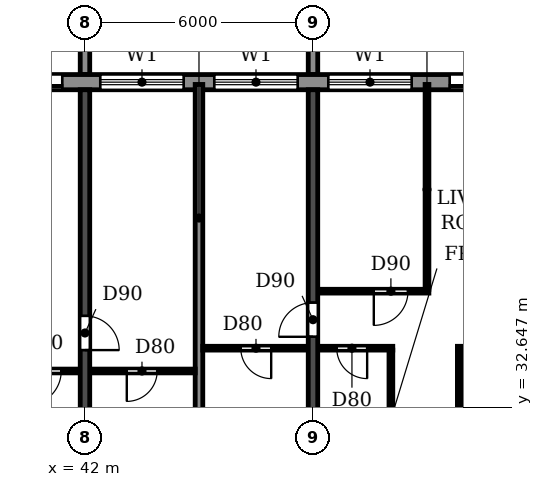
"""IFC4 building model, lengths in metres.
Left out: names, types, materials, properties, quantities, classifications, styles, units other than length and angle.
Written with IfcOpenShell. Run it as: python <this file> out.ifc"""

import sys

from ifc_helpers import new_model, si_unit, direction, frame, frame_2d, origin, place, context, subcontext, project, spatial, polyline, rectangle, outline, extrude, source, transform, mapped, element, fill, save


model = new_model("IFC4")
c1 = context("Model", 3, precision=1e-05, world=origin(), true_north=direction((0.0, 1.0)))
c2 = subcontext(c1, "Body", "Model", "MODEL_VIEW")
j1 = project(units=[si_unit("LENGTHUNIT", "METRE"), si_unit("PLANEANGLEUNIT", "RADIAN")], contexts=[c1])
p1 = place(None, origin())
s1 = spatial("IfcSite", under=j1, at=p1, CompositionType="ELEMENT")
p2 = place(p1, origin())
s2 = spatial("IfcBuilding", under=s1, at=p2, CompositionType="ELEMENT")
p3 = place(p2, frame((0.0, 0.0, 221.4)))
s3 = spatial("IfcBuildingStorey", under=s2, at=p3, CompositionType="ELEMENT", Elevation=221.4)
p4 = place(p3, frame((42.0, 30.5, 0.0), z_axis=(0.0, 0.0, 1.0), x_axis=(0.0, 1.0, 0.0)))
e1 = element("IfcWall", 1, at=p4, inside=s3, PredefinedType="SHEAR", context=c2, shape_type="SweptSolid", body=[
    extrude(rectangle(XDim=10.5, YDim=0.25, at=frame_2d((5.25, 0.0))), origin(), (0.0, 0.0, 1.0), 3.08),
])
p5 = place(p4, frame((3.65, 0.0, 0.0)))
e2 = element("IfcOpeningElement", 2, at=p5, cuts=e1, PredefinedType="OPENING", context=c2, shape_type="SweptSolid", body=[
    extrude(rectangle(XDim=0.9, YDim=2.1, at=frame_2d((0.45, 1.05))), frame((0.0, 0.135, 0.0), z_axis=(0.0, -1.0, 0.0), x_axis=(1.0, 0.0, 0.0)), (0.0, 0.0, 1.0), 0.27),
])
p6 = place(p3, frame((48.0, 30.5, 0.0), z_axis=(0.0, 0.0, 1.0), x_axis=(0.0, 1.0, 0.0)))
e3 = element("IfcWall", 3, at=p6, inside=s3, PredefinedType="SHEAR", context=c2, shape_type="SweptSolid", body=[
    extrude(rectangle(XDim=10.5, YDim=0.25, at=frame_2d((5.25, 0.0))), origin(), (0.0, 0.0, 1.0), 3.08),
])
p7 = place(p6, frame((4.0, 0.0, 0.0)))
e4 = element("IfcOpeningElement", 4, at=p7, cuts=e3, PredefinedType="OPENING", context=c2, shape_type="SweptSolid", body=[
    extrude(rectangle(XDim=0.9, YDim=2.1, at=frame_2d((0.45, 1.05))), frame((0.0, 0.135, 0.0), z_axis=(0.0, -1.0, 0.0), x_axis=(1.0, 0.0, 0.0)), (0.0, 0.0, 1.0), 0.27),
])
p8 = place(p3, frame((79.317, 41.2, 0.0), z_axis=(0.0, 0.0, 1.0), x_axis=(-1.0, 0.0, 0.0)))
e5 = element("IfcWall", 5, at=p8, inside=s3, PredefinedType="STANDARD", context=c2, shape_type="SweptSolid", body=[
    extrude(rectangle(XDim=56.634, YDim=0.4, at=frame_2d((28.317, 0.0))), origin(), (0.0, 0.0, 1.0), 3.08),
])
p9 = place(p8, frame((52.717, 0.0, 0.9)))
e6 = element("IfcOpeningElement", 6, at=p9, cuts=e5, PredefinedType="OPENING", context=c2, shape_type="SweptSolid", body=[
    extrude(rectangle(XDim=2.2, YDim=1.5, at=frame_2d((1.1, 0.75))), frame((0.0, 0.21, 0.0), z_axis=(0.0, -1.0, 0.0), x_axis=(1.0, 0.0, 0.0)), (0.0, 0.0, 1.0), 0.42),
])
p10 = place(p8, frame((49.717, 0.0, 0.9)))
e7 = element("IfcOpeningElement", 7, at=p10, cuts=e5, PredefinedType="OPENING", context=c2, shape_type="SweptSolid", body=[
    extrude(rectangle(XDim=2.2, YDim=1.5, at=frame_2d((1.1, 0.75))), frame((0.0, 0.21, 0.0), z_axis=(0.0, -1.0, 0.0), x_axis=(1.0, 0.0, 0.0)), (0.0, 0.0, 1.0), 0.42),
])
p11 = place(p8, frame((46.917, 0.0, 0.0)))
e8 = element("IfcOpeningElement", 8, at=p11, cuts=e5, PredefinedType="OPENING", context=c2, shape_type="SweptSolid", body=[
    extrude(rectangle(XDim=1.8, YDim=2.4, at=frame_2d((0.9, 1.2))), frame((0.0, 0.21, 0.0), z_axis=(0.0, -1.0, 0.0), x_axis=(1.0, 0.0, 0.0)), (0.0, 0.0, 1.0), 0.42),
])
p12 = place(p8, frame((43.717, 0.0, 0.9)))
e9 = element("IfcOpeningElement", 9, at=p12, cuts=e5, PredefinedType="OPENING", context=c2, shape_type="SweptSolid", body=[
    extrude(rectangle(XDim=2.2, YDim=1.5, at=frame_2d((1.1, 0.75))), frame((0.0, 0.21, 0.0), z_axis=(0.0, -1.0, 0.0), x_axis=(1.0, 0.0, 0.0)), (0.0, 0.0, 1.0), 0.42),
])
p13 = place(p8, frame((40.717, 0.0, 0.9)))
e10 = element("IfcOpeningElement", 10, at=p13, cuts=e5, PredefinedType="OPENING", context=c2, shape_type="SweptSolid", body=[
    extrude(rectangle(XDim=2.2, YDim=1.5, at=frame_2d((1.1, 0.75))), frame((0.0, 0.21, 0.0), z_axis=(0.0, -1.0, 0.0), x_axis=(1.0, 0.0, 0.0)), (0.0, 0.0, 1.0), 0.42),
])
p14 = place(p8, frame((37.917, 0.0, 0.0)))
e11 = element("IfcOpeningElement", 11, at=p14, cuts=e5, PredefinedType="OPENING", context=c2, shape_type="SweptSolid", body=[
    extrude(rectangle(XDim=1.8, YDim=2.4, at=frame_2d((0.9, 1.2))), frame((0.0, 0.21, 0.0), z_axis=(0.0, -1.0, 0.0), x_axis=(1.0, 0.0, 0.0)), (0.0, 0.0, 1.0), 0.42),
])
p15 = place(p8, frame((34.717, 0.0, 0.9)))
e12 = element("IfcOpeningElement", 12, at=p15, cuts=e5, PredefinedType="OPENING", context=c2, shape_type="SweptSolid", body=[
    extrude(rectangle(XDim=2.2, YDim=1.5, at=frame_2d((1.1, 0.75))), frame((0.0, 0.21, 0.0), z_axis=(0.0, -1.0, 0.0), x_axis=(1.0, 0.0, 0.0)), (0.0, 0.0, 1.0), 0.42),
])
p16 = place(p8, frame((31.717, 0.0, 0.9)))
e13 = element("IfcOpeningElement", 13, at=p16, cuts=e5, PredefinedType="OPENING", context=c2, shape_type="SweptSolid", body=[
    extrude(rectangle(XDim=2.2, YDim=1.5, at=frame_2d((1.1, 0.75))), frame((0.0, 0.21, 0.0), z_axis=(0.0, -1.0, 0.0), x_axis=(1.0, 0.0, 0.0)), (0.0, 0.0, 1.0), 0.42),
])
p17 = place(p8, frame((28.717, 0.0, 0.9)))
e14 = element("IfcOpeningElement", 14, at=p17, cuts=e5, PredefinedType="OPENING", context=c2, shape_type="SweptSolid", body=[
    extrude(rectangle(XDim=2.2, YDim=1.5, at=frame_2d((1.1, 0.75))), frame((0.0, 0.21, 0.0), z_axis=(0.0, -1.0, 0.0), x_axis=(1.0, 0.0, 0.0)), (0.0, 0.0, 1.0), 0.42),
])
p18 = place(p8, frame((25.917, 0.0, 0.0)))
e15 = element("IfcOpeningElement", 15, at=p18, cuts=e5, PredefinedType="OPENING", context=c2, shape_type="SweptSolid", body=[
    extrude(rectangle(XDim=1.8, YDim=2.4, at=frame_2d((0.9, 1.2))), frame((0.0, 0.21, 0.0), z_axis=(0.0, -1.0, 0.0), x_axis=(1.0, 0.0, 0.0)), (0.0, 0.0, 1.0), 0.42),
])
p19 = place(p8, frame((22.717, 0.0, 0.9)))
e16 = element("IfcOpeningElement", 16, at=p19, cuts=e5, PredefinedType="OPENING", context=c2, shape_type="SweptSolid", body=[
    extrude(rectangle(XDim=2.2, YDim=1.5, at=frame_2d((1.1, 0.75))), frame((0.0, 0.21, 0.0), z_axis=(0.0, -1.0, 0.0), x_axis=(1.0, 0.0, 0.0)), (0.0, 0.0, 1.0), 0.42),
])
p20 = place(p8, frame((19.717, 0.0, 0.9)))
e17 = element("IfcOpeningElement", 17, at=p20, cuts=e5, PredefinedType="OPENING", context=c2, shape_type="SweptSolid", body=[
    extrude(rectangle(XDim=2.2, YDim=1.5, at=frame_2d((1.1, 0.75))), frame((0.0, 0.21, 0.0), z_axis=(0.0, -1.0, 0.0), x_axis=(1.0, 0.0, 0.0)), (0.0, 0.0, 1.0), 0.42),
])
p21 = place(p8, frame((16.717, 0.0, 0.9)))
e18 = element("IfcOpeningElement", 18, at=p21, cuts=e5, PredefinedType="OPENING", context=c2, shape_type="SweptSolid", body=[
    extrude(rectangle(XDim=2.2, YDim=1.5, at=frame_2d((1.1, 0.75))), frame((0.0, 0.21, 0.0), z_axis=(0.0, -1.0, 0.0), x_axis=(1.0, 0.0, 0.0)), (0.0, 0.0, 1.0), 0.42),
])
p22 = place(p8, frame((13.917, 0.0, 0.0)))
e19 = element("IfcOpeningElement", 19, at=p22, cuts=e5, PredefinedType="OPENING", context=c2, shape_type="SweptSolid", body=[
    extrude(rectangle(XDim=1.8, YDim=2.4, at=frame_2d((0.9, 1.2))), frame((0.0, 0.21, 0.0), z_axis=(0.0, -1.0, 0.0), x_axis=(1.0, 0.0, 0.0)), (0.0, 0.0, 1.0), 0.42),
])
p23 = place(p8, frame((10.717, 0.0, 0.9)))
e20 = element("IfcOpeningElement", 20, at=p23, cuts=e5, PredefinedType="OPENING", context=c2, shape_type="SweptSolid", body=[
    extrude(rectangle(XDim=2.2, YDim=1.5, at=frame_2d((1.1, 0.75))), frame((0.0, 0.21, 0.0), z_axis=(0.0, -1.0, 0.0), x_axis=(1.0, 0.0, 0.0)), (0.0, 0.0, 1.0), 0.42),
])
p24 = place(p8, frame((7.917, 0.0, 0.0)))
e21 = element("IfcOpeningElement", 21, at=p24, cuts=e5, PredefinedType="OPENING", context=c2, shape_type="SweptSolid", body=[
    extrude(rectangle(XDim=1.8, YDim=2.4, at=frame_2d((0.9, 1.2))), frame((0.0, 0.21, 0.0), z_axis=(0.0, -1.0, 0.0), x_axis=(1.0, 0.0, 0.0)), (0.0, 0.0, 1.0), 0.42),
])
p25 = place(p8, frame((4.717, 0.0, 0.9)))
e22 = element("IfcOpeningElement", 22, at=p25, cuts=e5, PredefinedType="OPENING", context=c2, shape_type="SweptSolid", body=[
    extrude(rectangle(XDim=2.2, YDim=1.5, at=frame_2d((1.1, 0.75))), frame((0.0, 0.21, 0.0), z_axis=(0.0, -1.0, 0.0), x_axis=(1.0, 0.0, 0.0)), (0.0, 0.0, 1.0), 0.42),
])
p26 = place(p8, frame((1.917, 0.0, 0.0)))
e23 = element("IfcOpeningElement", 23, at=p26, cuts=e5, PredefinedType="OPENING", context=c2, shape_type="SweptSolid", body=[
    extrude(rectangle(XDim=1.8, YDim=2.4, at=frame_2d((0.9, 1.2))), frame((0.0, 0.21, 0.0), z_axis=(0.0, -1.0, 0.0), x_axis=(1.0, 0.0, 0.0)), (0.0, 0.0, 1.0), 0.42),
])
m1 = source(origin(), c2, "Body", "SweptSolid", [
    extrude(outline(polyline([(0.0, 0.0), (0.25, 0.0), (0.25, 3.1), (0.0, 3.1), (0.0, 0.0)])), origin(), (0.0, 0.0, 1.0), 3.1),
])
for number, where in (
    (24, (41.875, 41.4, 0.0)),
    (25, (47.875, 41.4, 0.0)),
):
    element("IfcWall", number, at=place(p3, frame(where)), inside=s3, PredefinedType="STANDARD", context=c2, shape_type="MappedRepresentation", body=[
        mapped(m1, transform((0.0, 0.0, 0.0))),
    ])
p27 = place(p3, frame((45.0, 30.51, 0.0), z_axis=(0.0, 0.0, 1.0), x_axis=(0.0, 1.0, 0.0)))
e26 = element("IfcWall", 26, at=p27, inside=s3, PredefinedType="PARTITIONING", context=c2, shape_type="SweptSolid", body=[
    extrude(rectangle(XDim=10.63, YDim=0.2, at=frame_2d((5.315, 0.0))), origin(), (0.0, 0.0, 1.0), 3.08),
])
p28 = place(p3, frame((39.8, 33.6, 0.0), z_axis=(0.0, 0.0, 1.0), x_axis=(1.0, 0.0, 0.0)))
e27 = element("IfcWall", 27, at=p28, inside=s3, PredefinedType="PARTITIONING", context=c2, shape_type="SweptSolid", body=[
    extrude(rectangle(XDim=2.065, YDim=0.1, at=frame_2d((1.032, 0.0))), origin(), (0.0, 0.0, 1.0), 3.08),
])
p29 = place(p28, frame((0.675, 0.0, 0.0)))
e28 = element("IfcOpeningElement", 28, at=p29, cuts=e27, PredefinedType="OPENING", context=c2, shape_type="SweptSolid", body=[
    extrude(rectangle(XDim=0.9, YDim=2.1, at=frame_2d((0.45, 1.05))), frame((0.0, 0.06, 0.0), z_axis=(0.0, -1.0, 0.0), x_axis=(1.0, 0.0, 0.0)), (0.0, 0.0, 1.0), 0.12),
])
p30 = place(p3, frame((42.135, 33.6, 0.0), z_axis=(0.0, 0.0, 1.0), x_axis=(1.0, 0.0, 0.0)))
e29 = element("IfcWall", 29, at=p30, inside=s3, PredefinedType="PARTITIONING", context=c2, shape_type="SweptSolid", body=[
    extrude(rectangle(XDim=2.765, YDim=0.1, at=frame_2d((1.382, 0.0))), origin(), (0.0, 0.0, 1.0), 3.08),
])
p31 = place(p30, frame((0.965, 0.0, 0.0)))
e30 = element("IfcOpeningElement", 30, at=p31, cuts=e29, PredefinedType="OPENING", context=c2, shape_type="SweptSolid", body=[
    extrude(rectangle(XDim=0.8, YDim=2.1, at=frame_2d((0.4, 1.05))), frame((0.0, 0.06, 0.0), z_axis=(0.0, -1.0, 0.0), x_axis=(1.0, 0.0, 0.0)), (0.0, 0.0, 1.0), 0.12),
])
p32 = place(p3, frame((45.1, 34.2, 0.0), z_axis=(0.0, 0.0, 1.0), x_axis=(1.0, 0.0, 0.0)))
e31 = element("IfcWall", 31, at=p32, inside=s3, PredefinedType="PARTITIONING", context=c2, shape_type="SweptSolid", body=[
    extrude(rectangle(XDim=2.765, YDim=0.1, at=frame_2d((1.382, 0.0))), origin(), (0.0, 0.0, 1.0), 3.08),
])
p33 = place(p32, frame((1.0, 0.0, 0.0)))
e32 = element("IfcOpeningElement", 32, at=p33, cuts=e31, PredefinedType="OPENING", context=c2, shape_type="SweptSolid", body=[
    extrude(rectangle(XDim=0.8, YDim=2.1, at=frame_2d((0.4, 1.05))), frame((0.0, 0.06, 0.0), z_axis=(0.0, -1.0, 0.0), x_axis=(1.0, 0.0, 0.0)), (0.0, 0.0, 1.0), 0.12),
])
p34 = place(p3, frame((48.135, 34.2, 0.0), z_axis=(0.0, 0.0, 1.0), x_axis=(1.0, 0.0, 0.0)))
e33 = element("IfcWall", 33, at=p34, inside=s3, PredefinedType="PARTITIONING", context=c2, shape_type="SweptSolid", body=[
    extrude(rectangle(XDim=1.965, YDim=0.1, at=frame_2d((0.982, 0.0))), origin(), (0.0, 0.0, 1.0), 3.08),
])
p35 = place(p34, frame((0.49, 0.0, 0.0)))
e34 = element("IfcOpeningElement", 34, at=p35, cuts=e33, PredefinedType="OPENING", context=c2, shape_type="SweptSolid", body=[
    extrude(rectangle(XDim=0.8, YDim=2.1, at=frame_2d((0.4, 1.05))), frame((0.0, 0.06, 0.0), z_axis=(0.0, -1.0, 0.0), x_axis=(1.0, 0.0, 0.0)), (0.0, 0.0, 1.0), 0.12),
])
p36 = place(p3, frame((51.8, 34.2, 0.0), z_axis=(0.0, 0.0, 1.0), x_axis=(1.0, 0.0, 0.0)))
e35 = element("IfcWall", 35, at=p36, inside=s3, PredefinedType="PARTITIONING", context=c2, shape_type="SweptSolid", body=[
    extrude(rectangle(XDim=2.065, YDim=0.1, at=frame_2d((1.032, 0.0))), origin(), (0.0, 0.0, 1.0), 3.08),
])
p37 = place(p36, frame((0.675, 0.0, 0.0)))
e36 = element("IfcOpeningElement", 36, at=p37, cuts=e35, PredefinedType="OPENING", context=c2, shape_type="SweptSolid", body=[
    extrude(rectangle(XDim=0.9, YDim=2.1, at=frame_2d((0.45, 1.05))), frame((0.0, 0.06, 0.0), z_axis=(0.0, -1.0, 0.0), x_axis=(1.0, 0.0, 0.0)), (0.0, 0.0, 1.0), 0.12),
])
p38 = place(p3, frame((48.135, 35.7, 0.0), z_axis=(0.0, 0.0, 1.0), x_axis=(1.0, 0.0, 0.0)))
e37 = element("IfcWall", 37, at=p38, inside=s3, PredefinedType="PARTITIONING", context=c2, shape_type="SweptSolid", body=[
    extrude(rectangle(XDim=2.915, YDim=0.1, at=frame_2d((1.458, 0.0))), origin(), (0.0, 0.0, 1.0), 3.08),
])
p39 = place(p38, frame((1.465, 0.0, 0.0)))
e38 = element("IfcOpeningElement", 38, at=p39, cuts=e37, PredefinedType="OPENING", context=c2, shape_type="SweptSolid", body=[
    extrude(rectangle(XDim=0.9, YDim=2.1, at=frame_2d((0.45, 1.05))), frame((0.0, 0.06, 0.0), z_axis=(0.0, -1.0, 0.0), x_axis=(1.0, 0.0, 0.0)), (0.0, 0.0, 1.0), 0.12),
])
p40 = place(p3, frame((50.05, 30.51, 0.0), z_axis=(0.0, 0.0, 1.0), x_axis=(0.0, 1.0, 0.0)))
e39 = element("IfcWall", 39, at=p40, inside=s3, PredefinedType="PARTITIONING", context=c2, shape_type="SweptSolid", body=[
    extrude(rectangle(XDim=3.64, YDim=0.1, at=frame_2d((1.82, 0.0))), origin(), (0.0, 0.0, 1.0), 3.08),
])
p41 = place(p3, frame((51.0, 35.75, 0.0), z_axis=(0.0, 0.0, 1.0), x_axis=(0.0, 1.0, 0.0)))
e40 = element("IfcWall", 40, at=p41, inside=s3, PredefinedType="PARTITIONING", context=c2, shape_type="SweptSolid", body=[
    extrude(rectangle(XDim=5.39, YDim=0.1, at=frame_2d((2.695, 0.0))), origin(), (0.0, 0.0, 1.0), 3.08),
])
p42 = place(p3, frame((51.85, 30.51, 0.0), z_axis=(0.0, 0.0, 1.0), x_axis=(0.0, 1.0, 0.0)))
e41 = element("IfcWall", 41, at=p42, inside=s3, PredefinedType="PARTITIONING", context=c2, shape_type="SweptSolid", body=[
    extrude(rectangle(XDim=3.64, YDim=0.1, at=frame_2d((1.82, 0.0))), origin(), (0.0, 0.0, 1.0), 3.08),
])
p43 = place(p14, origin())
e42 = element("IfcDoor", 42, at=p43, inside=s3, OperationType="DOUBLE_DOOR_SLIDING", PredefinedType="DOOR", context=c2, shape_type="SweptSolid", body=[
    extrude(rectangle(XDim=1.8, YDim=2.4, at=frame_2d((0.9, 1.2))), frame((0.0, 0.025, 0.0), z_axis=(0.0, -1.0, 0.0), x_axis=(1.0, 0.0, 0.0)), (0.0, 0.0, 1.0), 0.05),
])
fill(e11, e42)
p44 = place(p15, origin())
e43 = element("IfcWindow", 43, at=p44, inside=s3, PartitioningType="DOUBLE_PANEL_HORIZONTAL", PredefinedType="WINDOW", context=c2, shape_type="SweptSolid", body=[
    extrude(rectangle(XDim=2.2, YDim=1.5, at=frame_2d((1.1, 0.75))), frame((0.0, 0.03, 0.0), z_axis=(0.0, -1.0, 0.0), x_axis=(1.0, 0.0, 0.0)), (0.0, 0.0, 1.0), 0.06),
])
fill(e12, e43)
p45 = place(p16, origin())
e44 = element("IfcWindow", 44, at=p45, inside=s3, PartitioningType="DOUBLE_PANEL_HORIZONTAL", PredefinedType="WINDOW", context=c2, shape_type="SweptSolid", body=[
    extrude(rectangle(XDim=2.2, YDim=1.5, at=frame_2d((1.1, 0.75))), frame((0.0, 0.03, 0.0), z_axis=(0.0, -1.0, 0.0), x_axis=(1.0, 0.0, 0.0)), (0.0, 0.0, 1.0), 0.06),
])
fill(e13, e44)
p46 = place(p17, origin())
e45 = element("IfcWindow", 45, at=p46, inside=s3, PartitioningType="DOUBLE_PANEL_HORIZONTAL", PredefinedType="WINDOW", context=c2, shape_type="SweptSolid", body=[
    extrude(rectangle(XDim=2.2, YDim=1.5, at=frame_2d((1.1, 0.75))), frame((0.0, 0.03, 0.0), z_axis=(0.0, -1.0, 0.0), x_axis=(1.0, 0.0, 0.0)), (0.0, 0.0, 1.0), 0.06),
])
fill(e14, e45)
p47 = place(p18, origin())
e46 = element("IfcDoor", 46, at=p47, inside=s3, OperationType="DOUBLE_DOOR_SLIDING", PredefinedType="DOOR", context=c2, shape_type="SweptSolid", body=[
    extrude(rectangle(XDim=1.8, YDim=2.4, at=frame_2d((0.9, 1.2))), frame((0.0, 0.025, 0.0), z_axis=(0.0, -1.0, 0.0), x_axis=(1.0, 0.0, 0.0)), (0.0, 0.0, 1.0), 0.05),
])
fill(e15, e46)
p48 = place(p31, frame((0.8, 0.0, 0.0), z_axis=(0.0, 0.0, 1.0), x_axis=(-1.0, 0.0, 0.0)))
e47 = element("IfcDoor", 47, at=p48, inside=s3, OperationType="SINGLE_SWING_RIGHT", PredefinedType="DOOR", context=c2, shape_type="SweptSolid", body=[
    extrude(rectangle(XDim=0.8, YDim=2.1, at=frame_2d((0.4, 1.05))), frame((0.0, 0.025, 0.0), z_axis=(0.0, -1.0, 0.0), x_axis=(1.0, 0.0, 0.0)), (0.0, 0.0, 1.0), 0.05),
])
fill(e30, e47)
p49 = place(p29, frame((0.9, 0.0, 0.0), z_axis=(0.0, 0.0, 1.0), x_axis=(-1.0, 0.0, 0.0)))
e48 = element("IfcDoor", 48, at=p49, inside=s3, OperationType="SINGLE_SWING_RIGHT", PredefinedType="DOOR", context=c2, shape_type="SweptSolid", body=[
    extrude(rectangle(XDim=0.9, YDim=2.1, at=frame_2d((0.45, 1.05))), frame((0.0, 0.025, 0.0), z_axis=(0.0, -1.0, 0.0), x_axis=(1.0, 0.0, 0.0)), (0.0, 0.0, 1.0), 0.05),
])
fill(e28, e48)
p50 = place(p5, frame((0.9, 0.0, 0.0), z_axis=(0.0, 0.0, 1.0), x_axis=(-1.0, 0.0, 0.0)))
e49 = element("IfcDoor", 49, at=p50, inside=s3, OperationType="SINGLE_SWING_RIGHT", PredefinedType="DOOR", context=c2, shape_type="SweptSolid", body=[
    extrude(rectangle(XDim=0.9, YDim=2.1, at=frame_2d((0.45, 1.05))), frame((0.0, 0.025, 0.0), z_axis=(0.0, -1.0, 0.0), x_axis=(1.0, 0.0, 0.0)), (0.0, 0.0, 1.0), 0.05),
])
fill(e2, e49)
p51 = place(p33, frame((0.8, 0.0, 0.0), z_axis=(0.0, 0.0, 1.0), x_axis=(-1.0, 0.0, 0.0)))
e50 = element("IfcDoor", 50, at=p51, inside=s3, OperationType="SINGLE_SWING_LEFT", PredefinedType="DOOR", context=c2, shape_type="SweptSolid", body=[
    extrude(rectangle(XDim=0.8, YDim=2.1, at=frame_2d((0.4, 1.05))), frame((0.0, 0.025, 0.0), z_axis=(0.0, -1.0, 0.0), x_axis=(1.0, 0.0, 0.0)), (0.0, 0.0, 1.0), 0.05),
])
fill(e32, e50)
p52 = place(p7, origin())
e51 = element("IfcDoor", 51, at=p52, inside=s3, OperationType="SINGLE_SWING_LEFT", PredefinedType="DOOR", context=c2, shape_type="SweptSolid", body=[
    extrude(rectangle(XDim=0.9, YDim=2.1, at=frame_2d((0.45, 1.05))), frame((0.0, 0.025, 0.0), z_axis=(0.0, -1.0, 0.0), x_axis=(1.0, 0.0, 0.0)), (0.0, 0.0, 1.0), 0.05),
])
fill(e4, e51)
p53 = place(p35, frame((0.8, 0.0, 0.0), z_axis=(0.0, 0.0, 1.0), x_axis=(-1.0, 0.0, 0.0)))
e52 = element("IfcDoor", 52, at=p53, inside=s3, OperationType="SINGLE_SWING_LEFT", PredefinedType="DOOR", context=c2, shape_type="SweptSolid", body=[
    extrude(rectangle(XDim=0.8, YDim=2.1, at=frame_2d((0.4, 1.05))), frame((0.0, 0.025, 0.0), z_axis=(0.0, -1.0, 0.0), x_axis=(1.0, 0.0, 0.0)), (0.0, 0.0, 1.0), 0.05),
])
fill(e34, e52)
p54 = place(p39, frame((0.9, 0.0, 0.0), z_axis=(0.0, 0.0, 1.0), x_axis=(-1.0, 0.0, 0.0)))
e53 = element("IfcDoor", 53, at=p54, inside=s3, OperationType="SINGLE_SWING_RIGHT", PredefinedType="DOOR", context=c2, shape_type="SweptSolid", body=[
    extrude(rectangle(XDim=0.9, YDim=2.1, at=frame_2d((0.45, 1.05))), frame((0.0, 0.025, 0.0), z_axis=(0.0, -1.0, 0.0), x_axis=(1.0, 0.0, 0.0)), (0.0, 0.0, 1.0), 0.05),
])
fill(e38, e53)
save(model, sys.argv[1])
